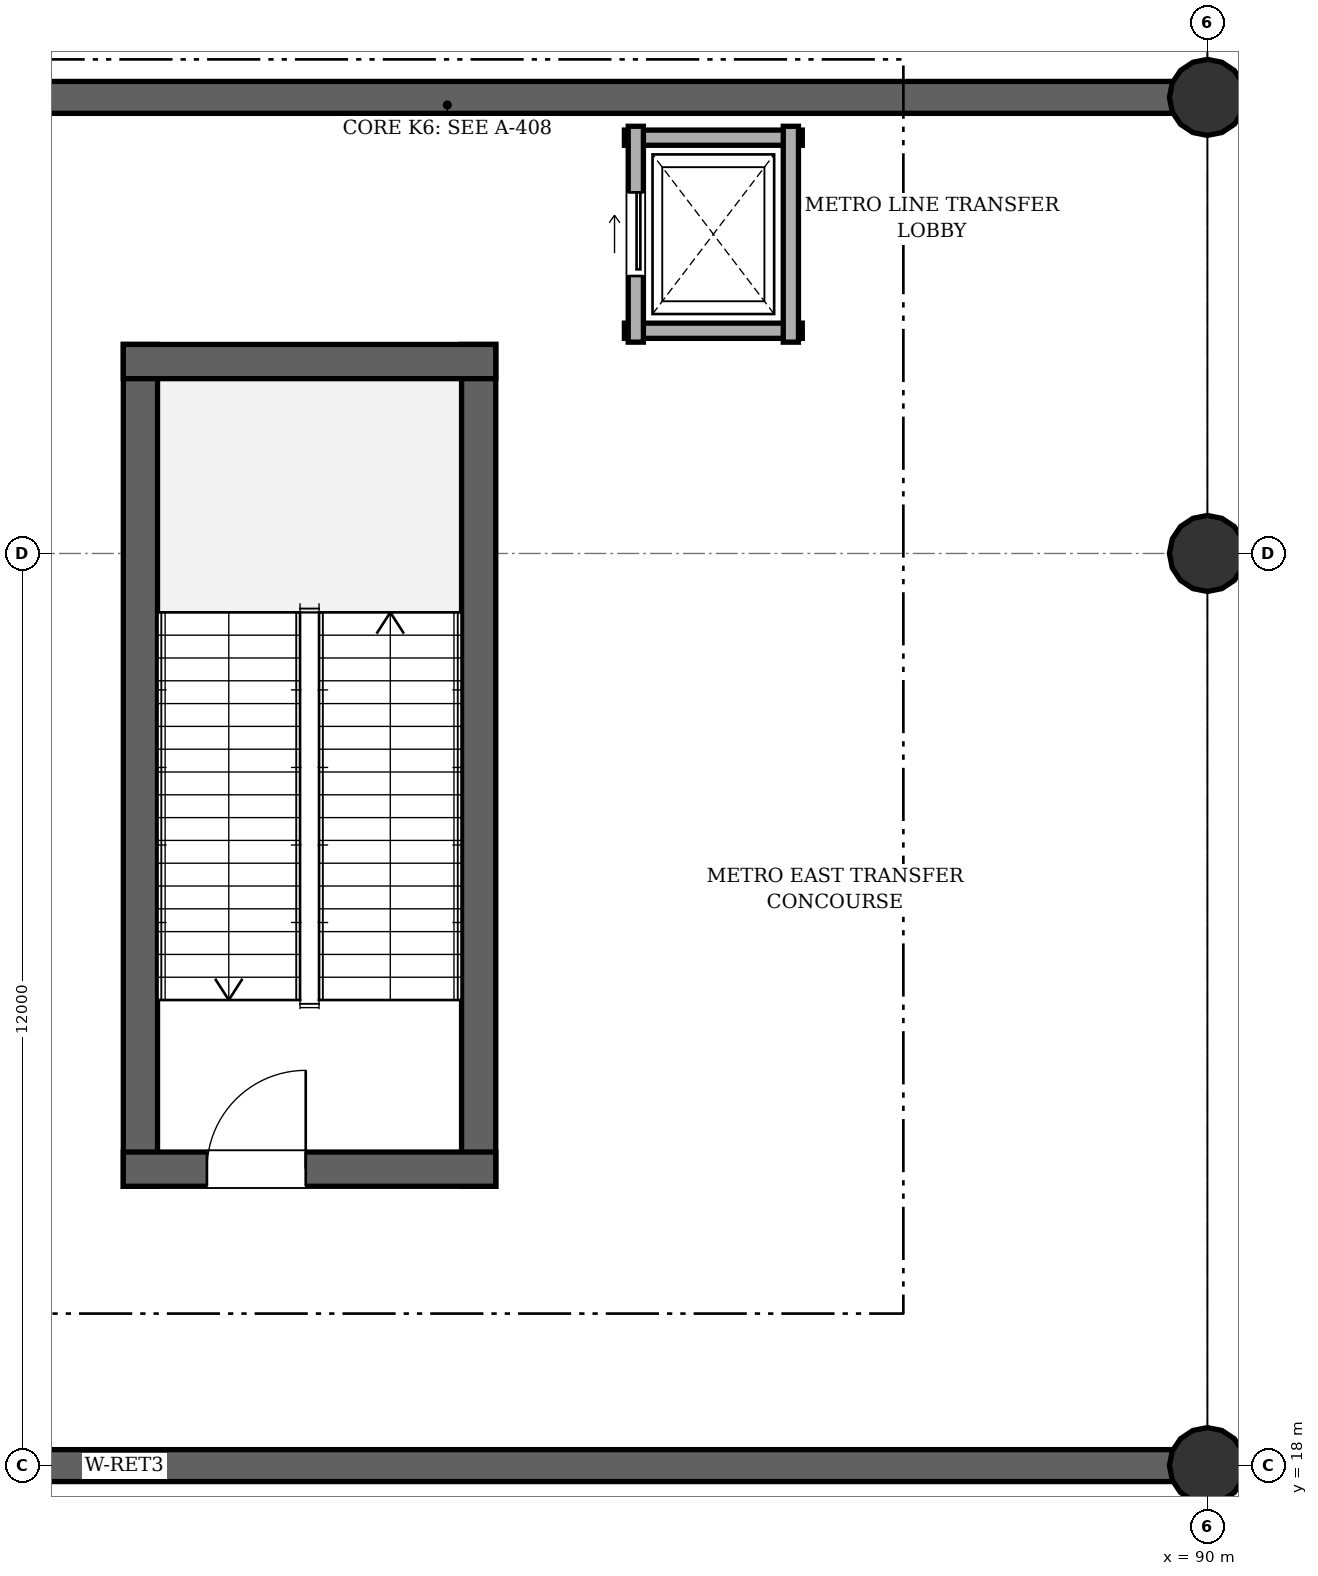
"""IFC4 building model, lengths in metres.
Left out: names, types, materials, properties, quantities, classifications, styles, units other than length and angle.
Written with IfcOpenShell. Run it as: python <this file> out.ifc"""

import sys

from ifc_helpers import new_model, si_unit, direction, frame, frame_2d, origin, origin_2d, place, context, subcontext, project, spatial, rectangle, circle, extrude, element, fill, save


model = new_model("IFC4")
c1 = context("Model", 3, precision=1e-05, world=origin(), true_north=direction((0.0, 1.0)))
c2 = subcontext(c1, "Body", "Model", "MODEL_VIEW")
j1 = project(units=[si_unit("LENGTHUNIT", "METRE"), si_unit("PLANEANGLEUNIT", "RADIAN")], contexts=[c1])
p1 = place(None, origin())
s1 = spatial("IfcSite", under=j1, at=p1, CompositionType="ELEMENT")
p2 = place(p1, origin())
s2 = spatial("IfcBuilding", under=s1, at=p2, CompositionType="ELEMENT")
p3 = place(p2, frame((0.0, 0.0, -5.4)))
s3 = spatial("IfcBuildingStorey", under=s2, at=p3, CompositionType="ELEMENT", Elevation=-5.4)
for number, where, z_axis, x_axis in (
    (1, (90.0, 18.0, 0.0), (0.0, 0.0, 1.0), (1.0, 0.0, 0.0)),
    (2, (90.0, 30.0, 0.0), (0.0, 0.0, 1.0), (1.0, 0.0, 0.0)),
    (3, (90.0, 36.0, 0.0), (0.0, 0.0, 1.0), (1.0, 0.0, 0.0)),
):
    element("IfcColumn", number, at=place(p3, frame(where, z_axis=z_axis, x_axis=x_axis)), inside=s3, PredefinedType="COLUMN", context=c2, shape_type="SweptSolid", body=[
        extrude(circle(Radius=0.5, at=origin_2d()), origin(), (0.0, 0.0, 1.0), 5.4),
    ])
for number, where, z_axis, x_axis in (
    (4, (18.0, 18.0, 0.0), (0.0, 0.0, 1.0), (1.0, 0.0, 0.0)),
    (5, (90.0, 36.0, 0.0), (0.0, 0.0, 1.0), (-1.0, 0.0, 0.0)),
):
    element("IfcWall", number, at=place(p3, frame(where, z_axis=z_axis, x_axis=x_axis)), inside=s3, PredefinedType="USERDEFINED", context=c2, shape_type="SweptSolid", body=[
        extrude(rectangle(XDim=72.0, YDim=0.42, at=frame_2d((36.0, 0.0))), origin(), (0.0, 0.0, 1.0), 5.05),
    ])
for number, where, z_axis, x_axis in (
    (6, (80.413, 21.675, 0.0), (0.0, 0.0, 1.0), (0.0, 1.0, 0.0)),
    (7, (75.962, 32.75, 0.0), (0.0, 0.0, 1.0), (0.0, -1.0, 0.0)),
):
    element("IfcWall", number, at=place(p3, frame(where, z_axis=z_axis, x_axis=x_axis)), inside=s3, PredefinedType="SHEAR", context=c2, shape_type="SweptSolid", body=[
        extrude(rectangle(XDim=11.075, YDim=0.45, at=frame_2d((5.538, 0.0))), origin(), (0.0, 0.0, 1.0), 5.05),
    ])
p4 = place(p3, frame((80.637, 32.525, 0.0), z_axis=(0.0, 0.0, 1.0), x_axis=(-1.0, 0.0, 0.0)))
e8 = element("IfcWall", 8, at=p4, inside=s3, PredefinedType="SHEAR", context=c2, shape_type="SweptSolid", body=[
    extrude(rectangle(XDim=4.9, YDim=0.45, at=frame_2d((2.45, 0.0))), origin(), (0.0, 0.0, 1.0), 5.05),
])
p5 = place(p3, frame((75.738, 21.9, 0.0), z_axis=(0.0, 0.0, 1.0), x_axis=(1.0, 0.0, 0.0)))
e9 = element("IfcWall", 9, at=p5, inside=s3, PredefinedType="SHEAR", context=c2, shape_type="SweptSolid", body=[
    extrude(rectangle(XDim=4.9, YDim=0.45, at=frame_2d((2.45, 0.0))), origin(), (0.0, 0.0, 1.0), 5.05),
])
p6 = place(p5, frame((1.1, 0.0, 0.0)))
e10 = element("IfcOpeningElement", 10, at=p6, cuts=e9, PredefinedType="OPENING", context=c2, shape_type="SweptSolid", body=[
    extrude(rectangle(XDim=1.3, YDim=2.1, at=frame_2d((0.65, 1.05))), frame((0.0, 0.235, 0.0), z_axis=(0.0, -1.0, 0.0), x_axis=(1.0, 0.0, 0.0)), (0.0, 0.0, 1.0), 0.47),
])
p7 = place(p3, frame((82.33, 32.93, 0.0), z_axis=(0.0, 0.0, 1.0), x_axis=(1.0, 0.0, 0.0)))
e11 = element("IfcWall", 11, at=p7, inside=s3, PredefinedType="SOLIDWALL", context=c2, shape_type="SweptSolid", body=[
    extrude(rectangle(XDim=2.34, YDim=0.2, at=frame_2d((1.17, 0.0))), origin(), (0.0, 0.0, 1.0), 4.4),
])
p8 = place(p3, frame((84.67, 35.47, 0.0), z_axis=(0.0, 0.0, 1.0), x_axis=(-1.0, 0.0, 0.0)))
e12 = element("IfcWall", 12, at=p8, inside=s3, PredefinedType="SOLIDWALL", context=c2, shape_type="SweptSolid", body=[
    extrude(rectangle(XDim=2.34, YDim=0.2, at=frame_2d((1.17, 0.0))), origin(), (0.0, 0.0, 1.0), 4.325),
])
p9 = place(p3, frame((82.48, 35.62, 0.0), z_axis=(0.0, 0.0, 1.0), x_axis=(0.0, -1.0, 0.0)))
e13 = element("IfcWall", 13, at=p9, inside=s3, PredefinedType="SOLIDWALL", context=c2, shape_type="SweptSolid", body=[
    extrude(rectangle(XDim=2.84, YDim=0.2, at=frame_2d((1.42, 0.0))), origin(), (0.0, 0.0, 1.0), 4.325),
])
p10 = place(p9, frame((0.87, 0.0, 0.0)))
e14 = element("IfcOpeningElement", 14, at=p10, cuts=e13, PredefinedType="OPENING", context=c2, shape_type="SweptSolid", body=[
    extrude(rectangle(XDim=1.1, YDim=2.15, at=frame_2d((0.55, 1.075))), frame((0.0, 0.11, 0.0), z_axis=(0.0, -1.0, 0.0), x_axis=(1.0, 0.0, 0.0)), (0.0, 0.0, 1.0), 0.22),
])
p11 = place(p3, frame((84.52, 32.78, 0.0), z_axis=(0.0, 0.0, 1.0), x_axis=(0.0, 1.0, 0.0)))
e15 = element("IfcWall", 15, at=p11, inside=s3, PredefinedType="SOLIDWALL", context=c2, shape_type="SweptSolid", body=[
    extrude(rectangle(XDim=2.84, YDim=0.2, at=frame_2d((1.42, 0.0))), origin(), (0.0, 0.0, 1.0), 4.325),
])
p12 = place(p6, origin())
e16 = element("IfcDoor", 16, at=p12, inside=s3, OperationType="SINGLE_SWING_RIGHT", PredefinedType="DOOR", context=c2, shape_type="SweptSolid", body=[
    extrude(rectangle(XDim=1.3, YDim=2.1, at=frame_2d((0.65, 1.05))), frame((0.0, 0.025, 0.0), z_axis=(0.0, -1.0, 0.0), x_axis=(1.0, 0.0, 0.0)), (0.0, 0.0, 1.0), 0.05),
])
fill(e10, e16)
p13 = place(p10, origin())
e17 = element("IfcDoor", 17, at=p13, inside=s3, OperationType="SLIDING_TO_LEFT", PredefinedType="DOOR", context=c2, shape_type="SweptSolid", body=[
    extrude(rectangle(XDim=1.1, YDim=2.15, at=frame_2d((0.55, 1.075))), frame((0.0, 0.025, 0.0), z_axis=(0.0, -1.0, 0.0), x_axis=(1.0, 0.0, 0.0)), (0.0, 0.0, 1.0), 0.05),
])
fill(e14, e17)
save(model, sys.argv[1])
